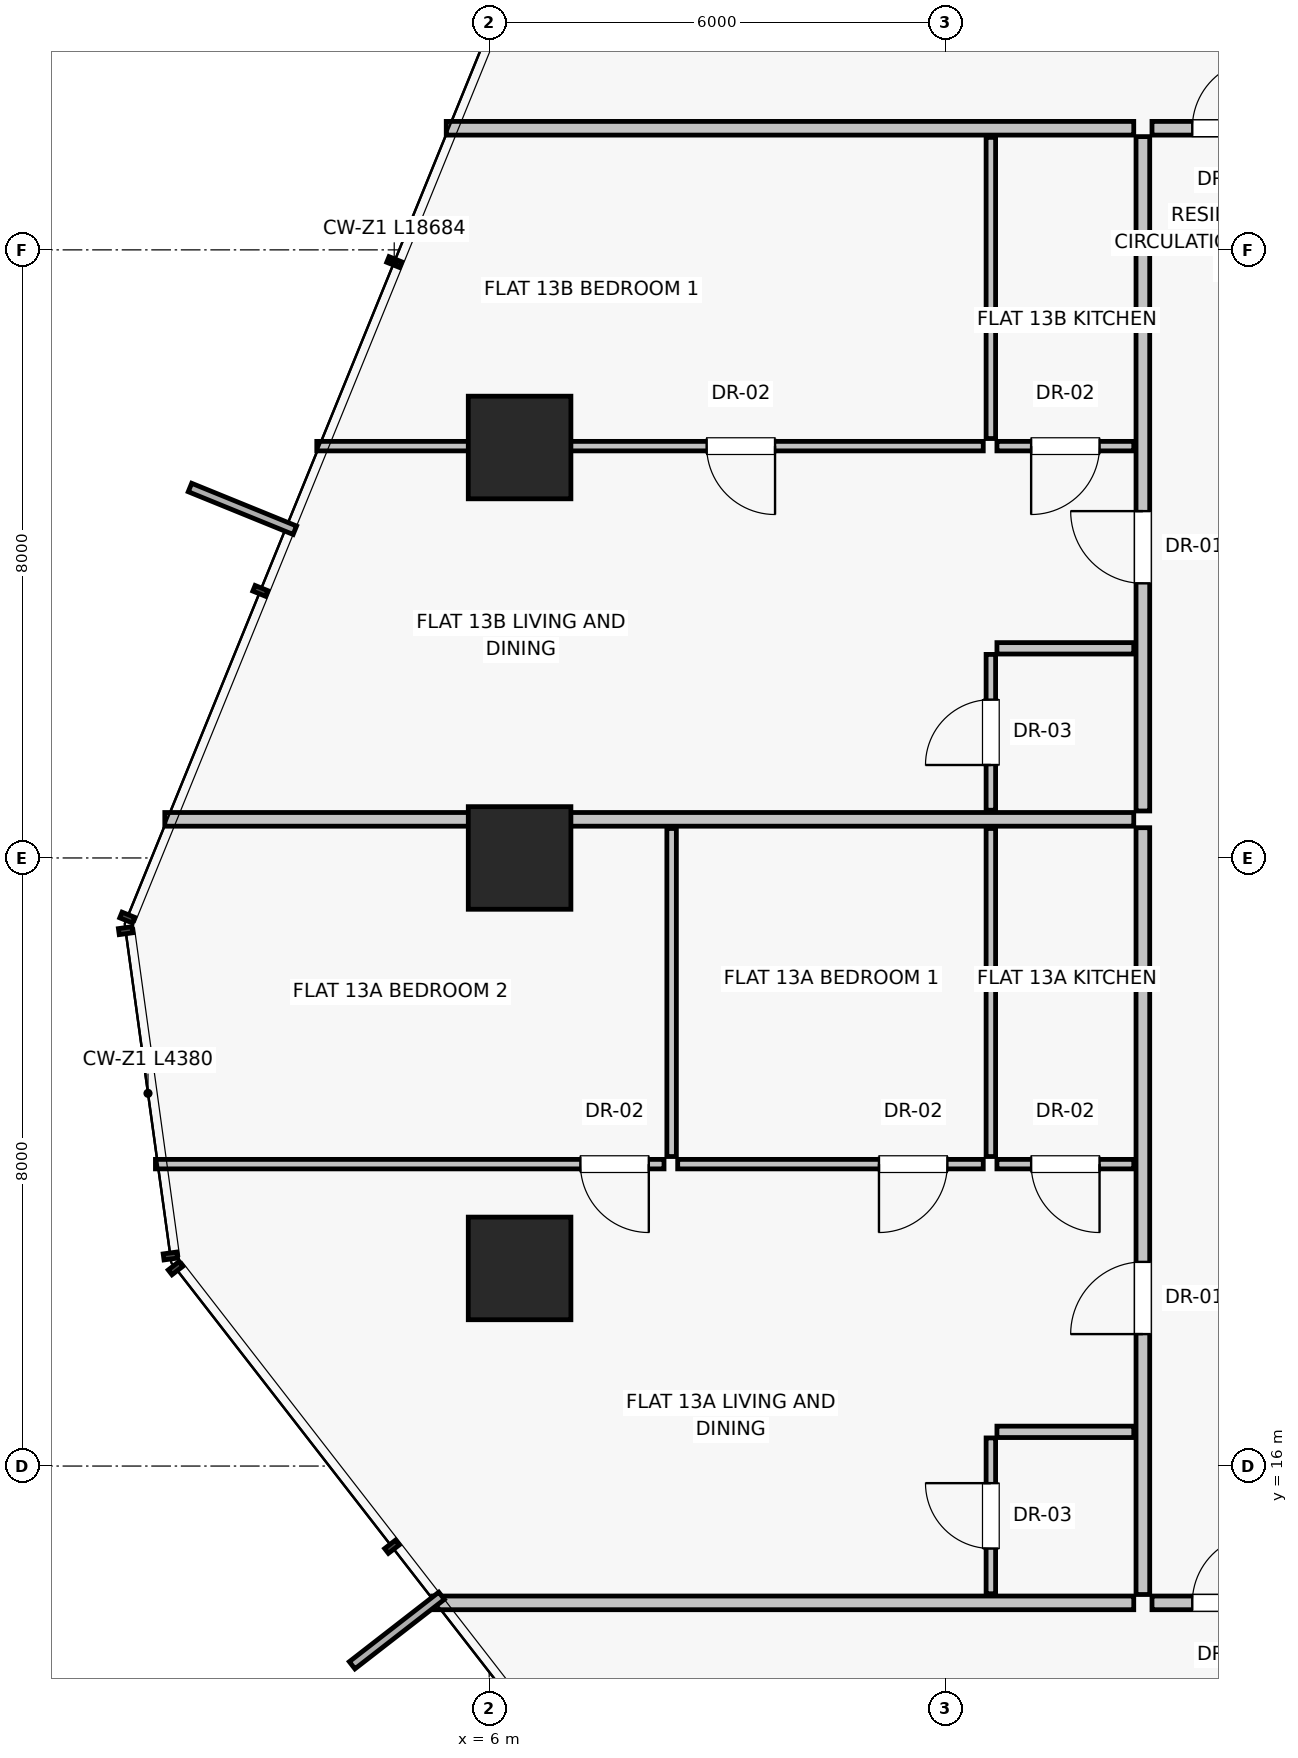
"""IFC4 building model, lengths in metres.
Left out: names, types, materials, properties, quantities, classifications, styles, units other than length and angle.
Written with IfcOpenShell. Run it as: python <this file> out.ifc"""

import sys

from ifc_helpers import new_model, si_unit, direction, frame, frame_2d, origin, origin_2d, place, context, subcontext, project, spatial, rectangle, extrude, source, transform, mapped, element, fill, save


model = new_model("IFC4")
c1 = context("Model", 3, precision=1e-05, world=origin(), true_north=direction((0.0, 1.0)))
c2 = subcontext(c1, "Body", "Model", "MODEL_VIEW")
j1 = project(units=[si_unit("LENGTHUNIT", "METRE"), si_unit("PLANEANGLEUNIT", "RADIAN")], contexts=[c1])
p1 = place(None, origin())
s1 = spatial("IfcSite", under=j1, at=p1, CompositionType="ELEMENT")
p2 = place(p1, origin())
s2 = spatial("IfcBuilding", under=s1, at=p2, CompositionType="ELEMENT")
p3 = place(p2, frame((0.0, 0.0, 50.05)))
s3 = spatial("IfcBuildingStorey", under=s2, at=p3, CompositionType="ELEMENT", Elevation=50.05)
for number, where, z_axis, x_axis in (
    (1, (6.4, 29.4, 0.0), (0.0, 0.0, 1.0), (1.0, 0.0, 0.0)),
    (2, (6.4, 24.0, 0.0), (0.0, 0.0, 1.0), (1.0, 0.0, 0.0)),
    (3, (6.4, 18.6, 0.0), (0.0, 0.0, 1.0), (1.0, 0.0, 0.0)),
):
    element("IfcColumn", number, at=place(p3, frame(where, z_axis=z_axis, x_axis=x_axis)), inside=s3, PredefinedType="COLUMN", context=c2, shape_type="SweptSolid", body=[
        extrude(rectangle(XDim=1.35, YDim=1.35, at=origin_2d()), origin(), (0.0, 0.0, 1.0), 3.25),
    ])
p4 = place(p3, frame((14.48, 14.2, 0.0), z_axis=(0.0, 0.0, 1.0), x_axis=(-1.0, 0.0, 0.0)))
e4 = element("IfcWall", 4, at=p4, inside=s3, PredefinedType="PARTITIONING", context=c2, shape_type="SweptSolid", body=[
    extrude(rectangle(XDim=9.224, YDim=0.18, at=frame_2d((4.612, 0.0))), origin(), (0.0, 0.0, 1.0), 3.0),
])
p5 = place(p3, frame((14.48, 33.6, 0.0), z_axis=(0.0, 0.0, 1.0), x_axis=(-1.0, 0.0, 0.0)))
e5 = element("IfcWall", 5, at=p5, inside=s3, PredefinedType="PARTITIONING", context=c2, shape_type="SweptSolid", body=[
    extrude(rectangle(XDim=9.045, YDim=0.18, at=frame_2d((4.522, 0.0))), origin(), (0.0, 0.0, 1.0), 3.0),
])
p6 = place(p3, frame((14.6, 14.31, 0.0), z_axis=(0.0, 0.0, 1.0), x_axis=(0.0, 1.0, 0.0)))
e6 = element("IfcWall", 6, at=p6, inside=s3, PredefinedType="PARTITIONING", context=c2, shape_type="SweptSolid", body=[
    extrude(rectangle(XDim=10.088, YDim=0.18, at=frame_2d((5.044, 0.0))), origin(), (0.0, 0.0, 1.0), 3.0),
])
p7 = place(p6, frame((3.426, 0.0, 0.0)))
e7 = element("IfcOpeningElement", 7, at=p7, cuts=e6, PredefinedType="OPENING", context=c2, shape_type="SweptSolid", body=[
    extrude(rectangle(XDim=0.95, YDim=2.02, at=frame_2d((0.475, 1.01))), frame((0.0, 0.1, 0.0), z_axis=(0.0, -1.0, 0.0), x_axis=(1.0, 0.0, 0.0)), (0.0, 0.0, 1.0), 0.2),
])
p8 = place(p3, frame((14.48, 16.45, 0.0), z_axis=(0.0, 0.0, 1.0), x_axis=(-1.0, 0.0, 0.0)))
e8 = element("IfcWall", 8, at=p8, inside=s3, PredefinedType="PARTITIONING", context=c2, shape_type="SweptSolid", body=[
    extrude(rectangle(XDim=1.8, YDim=0.15, at=frame_2d((0.9, 0.0))), origin(), (0.0, 0.0, 1.0), 3.0),
])
p9 = place(p3, frame((12.6, 14.32, 0.0), z_axis=(0.0, 0.0, 1.0), x_axis=(0.0, 1.0, 0.0)))
e9 = element("IfcWall", 9, at=p9, inside=s3, PredefinedType="PARTITIONING", context=c2, shape_type="SweptSolid", body=[
    extrude(rectangle(XDim=2.05, YDim=0.125, at=frame_2d((1.025, 0.0))), origin(), (0.0, 0.0, 1.0), 3.0),
])
p10 = place(p9, frame((0.595, 0.0, 0.0)))
e10 = element("IfcOpeningElement", 10, at=p10, cuts=e9, PredefinedType="OPENING", context=c2, shape_type="SweptSolid", body=[
    extrude(rectangle(XDim=0.86, YDim=2.01, at=frame_2d((0.43, 1.005))), frame((0.0, 0.073, 0.0), z_axis=(0.0, -1.0, 0.0), x_axis=(1.0, 0.0, 0.0)), (0.0, 0.0, 1.0), 0.145),
])
p11 = place(p3, frame((14.48, 19.972, 0.0), z_axis=(0.0, 0.0, 1.0), x_axis=(-1.0, 0.0, 0.0)))
e11 = element("IfcWall", 11, at=p11, inside=s3, PredefinedType="PARTITIONING", context=c2, shape_type="SweptSolid", body=[
    extrude(rectangle(XDim=1.8, YDim=0.125, at=frame_2d((0.9, 0.0))), origin(), (0.0, 0.0, 1.0), 3.0),
])
p12 = place(p11, frame((0.45, 0.0, 0.0)))
e12 = element("IfcOpeningElement", 12, at=p12, cuts=e11, PredefinedType="OPENING", context=c2, shape_type="SweptSolid", body=[
    extrude(rectangle(XDim=0.9, YDim=2.01, at=frame_2d((0.45, 1.005))), frame((0.0, 0.073, 0.0), z_axis=(0.0, -1.0, 0.0), x_axis=(1.0, 0.0, 0.0)), (0.0, 0.0, 1.0), 0.145),
])
for number, where, z_axis, x_axis in (
    (13, (12.6, 20.072, 0.0), (0.0, 0.0, 1.0), (0.0, 1.0, 0.0)),
    (14, (8.4, 20.072, 0.0), (0.0, 0.0, 1.0), (0.0, 1.0, 0.0)),
):
    element("IfcWall", number, at=place(p3, frame(where, z_axis=z_axis, x_axis=x_axis)), inside=s3, PredefinedType="PARTITIONING", context=c2, shape_type="SweptSolid", body=[
        extrude(rectangle(XDim=4.316, YDim=0.125, at=frame_2d((2.158, 0.0))), origin(), (0.0, 0.0, 1.0), 3.0),
    ])
p13 = place(p3, frame((12.5, 19.972, 0.0), z_axis=(0.0, 0.0, 1.0), x_axis=(-1.0, 0.0, 0.0)))
e15 = element("IfcWall", 15, at=p13, inside=s3, PredefinedType="PARTITIONING", context=c2, shape_type="SweptSolid", body=[
    extrude(rectangle(XDim=4.02, YDim=0.125, at=frame_2d((2.01, 0.0))), origin(), (0.0, 0.0, 1.0), 3.0),
])
p14 = place(p13, frame((0.472, 0.0, 0.0)))
e16 = element("IfcOpeningElement", 16, at=p14, cuts=e15, PredefinedType="OPENING", context=c2, shape_type="SweptSolid", body=[
    extrude(rectangle(XDim=0.9, YDim=2.01, at=frame_2d((0.45, 1.005))), frame((0.0, 0.073, 0.0), z_axis=(0.0, -1.0, 0.0), x_axis=(1.0, 0.0, 0.0)), (0.0, 0.0, 1.0), 0.145),
])
p15 = place(p3, frame((8.3, 19.972, 0.0), z_axis=(0.0, 0.0, 1.0), x_axis=(-1.0, 0.0, 0.0)))
e17 = element("IfcWall", 17, at=p15, inside=s3, PredefinedType="PARTITIONING", context=c2, shape_type="SweptSolid", body=[
    extrude(rectangle(XDim=6.691, YDim=0.125, at=frame_2d((3.345, 0.0))), origin(), (0.0, 0.0, 1.0), 3.0),
])
p16 = place(p15, frame((0.2, 0.0, 0.0)))
e18 = element("IfcOpeningElement", 18, at=p16, cuts=e17, PredefinedType="OPENING", context=c2, shape_type="SweptSolid", body=[
    extrude(rectangle(XDim=0.9, YDim=2.01, at=frame_2d((0.45, 1.005))), frame((0.0, 0.073, 0.0), z_axis=(0.0, -1.0, 0.0), x_axis=(1.0, 0.0, 0.0)), (0.0, 0.0, 1.0), 0.145),
])
p17 = place(p3, frame((14.48, 24.508, 0.0), z_axis=(0.0, 0.0, 1.0), x_axis=(-1.0, 0.0, 0.0)))
e19 = element("IfcWall", 19, at=p17, inside=s3, PredefinedType="PARTITIONING", context=c2, shape_type="SweptSolid", body=[
    extrude(rectangle(XDim=12.748, YDim=0.18, at=frame_2d((6.374, 0.0))), origin(), (0.0, 0.0, 1.0), 3.0),
])
p18 = place(p3, frame((14.6, 24.618, 0.0), z_axis=(0.0, 0.0, 1.0), x_axis=(0.0, 1.0, 0.0)))
e20 = element("IfcWall", 20, at=p18, inside=s3, PredefinedType="PARTITIONING", context=c2, shape_type="SweptSolid", body=[
    extrude(rectangle(XDim=8.872, YDim=0.18, at=frame_2d((4.436, 0.0))), origin(), (0.0, 0.0, 1.0), 3.0),
])
p19 = place(p18, frame((2.995, 0.0, 0.0)))
e21 = element("IfcOpeningElement", 21, at=p19, cuts=e20, PredefinedType="OPENING", context=c2, shape_type="SweptSolid", body=[
    extrude(rectangle(XDim=0.95, YDim=2.02, at=frame_2d((0.475, 1.01))), frame((0.0, 0.1, 0.0), z_axis=(0.0, -1.0, 0.0), x_axis=(1.0, 0.0, 0.0)), (0.0, 0.0, 1.0), 0.2),
])
p20 = place(p3, frame((14.48, 26.758, 0.0), z_axis=(0.0, 0.0, 1.0), x_axis=(-1.0, 0.0, 0.0)))
e22 = element("IfcWall", 22, at=p20, inside=s3, PredefinedType="PARTITIONING", context=c2, shape_type="SweptSolid", body=[
    extrude(rectangle(XDim=1.8, YDim=0.15, at=frame_2d((0.9, 0.0))), origin(), (0.0, 0.0, 1.0), 3.0),
])
p21 = place(p3, frame((12.6, 24.628, 0.0), z_axis=(0.0, 0.0, 1.0), x_axis=(0.0, 1.0, 0.0)))
e23 = element("IfcWall", 23, at=p21, inside=s3, PredefinedType="PARTITIONING", context=c2, shape_type="SweptSolid", body=[
    extrude(rectangle(XDim=2.05, YDim=0.125, at=frame_2d((1.025, 0.0))), origin(), (0.0, 0.0, 1.0), 3.0),
])
p22 = place(p21, frame((0.595, 0.0, 0.0)))
e24 = element("IfcOpeningElement", 24, at=p22, cuts=e23, PredefinedType="OPENING", context=c2, shape_type="SweptSolid", body=[
    extrude(rectangle(XDim=0.86, YDim=2.01, at=frame_2d((0.43, 1.005))), frame((0.0, 0.073, 0.0), z_axis=(0.0, -1.0, 0.0), x_axis=(1.0, 0.0, 0.0)), (0.0, 0.0, 1.0), 0.145),
])
p23 = place(p3, frame((14.48, 29.418, 0.0), z_axis=(0.0, 0.0, 1.0), x_axis=(-1.0, 0.0, 0.0)))
e25 = element("IfcWall", 25, at=p23, inside=s3, PredefinedType="PARTITIONING", context=c2, shape_type="SweptSolid", body=[
    extrude(rectangle(XDim=1.8, YDim=0.125, at=frame_2d((0.9, 0.0))), origin(), (0.0, 0.0, 1.0), 3.0),
])
p24 = place(p23, frame((0.45, 0.0, 0.0)))
e26 = element("IfcOpeningElement", 26, at=p24, cuts=e25, PredefinedType="OPENING", context=c2, shape_type="SweptSolid", body=[
    extrude(rectangle(XDim=0.9, YDim=2.01, at=frame_2d((0.45, 1.005))), frame((0.0, 0.073, 0.0), z_axis=(0.0, -1.0, 0.0), x_axis=(1.0, 0.0, 0.0)), (0.0, 0.0, 1.0), 0.145),
])
p25 = place(p3, frame((12.6, 29.518, 0.0), z_axis=(0.0, 0.0, 1.0), x_axis=(0.0, 1.0, 0.0)))
e27 = element("IfcWall", 27, at=p25, inside=s3, PredefinedType="PARTITIONING", context=c2, shape_type="SweptSolid", body=[
    extrude(rectangle(XDim=3.962, YDim=0.125, at=frame_2d((1.981, 0.0))), origin(), (0.0, 0.0, 1.0), 3.0),
])
p26 = place(p3, frame((12.5, 29.418, 0.0), z_axis=(0.0, 0.0, 1.0), x_axis=(-1.0, 0.0, 0.0)))
e28 = element("IfcWall", 28, at=p26, inside=s3, PredefinedType="PARTITIONING", context=c2, shape_type="SweptSolid", body=[
    extrude(rectangle(XDim=8.768, YDim=0.125, at=frame_2d((4.384, 0.0))), origin(), (0.0, 0.0, 1.0), 2.299),
])
p27 = place(p26, frame((2.739, 0.0, 0.0)))
e29 = element("IfcOpeningElement", 29, at=p27, cuts=e28, PredefinedType="OPENING", context=c2, shape_type="SweptSolid", body=[
    extrude(rectangle(XDim=0.9, YDim=2.01, at=frame_2d((0.45, 1.005))), frame((0.0, 0.073, 0.0), z_axis=(0.0, -1.0, 0.0), x_axis=(1.0, 0.0, 0.0)), (0.0, 0.0, 1.0), 0.145),
])
p28 = place(p3, frame((14.72, 14.2, 0.0), z_axis=(0.0, 0.0, 1.0), x_axis=(1.0, 0.0, 0.0)))
e30 = element("IfcWall", 30, at=p28, inside=s3, PredefinedType="PARTITIONING", context=c2, shape_type="SweptSolid", body=[
    extrude(rectangle(XDim=1.96, YDim=0.18, at=frame_2d((0.98, 0.0))), origin(), (0.0, 0.0, 1.0), 3.0),
])
p29 = place(p28, frame((0.53, 0.0, 0.0)))
e31 = element("IfcOpeningElement", 31, at=p29, cuts=e30, PredefinedType="OPENING", context=c2, shape_type="SweptSolid", body=[
    extrude(rectangle(XDim=0.9, YDim=2.01, at=frame_2d((0.45, 1.005))), frame((0.0, 0.1, 0.0), z_axis=(0.0, -1.0, 0.0), x_axis=(1.0, 0.0, 0.0)), (0.0, 0.0, 1.0), 0.2),
])
p30 = place(p3, frame((14.72, 33.6, 0.0), z_axis=(0.0, 0.0, 1.0), x_axis=(1.0, 0.0, 0.0)))
e32 = element("IfcWall", 32, at=p30, inside=s3, PredefinedType="PARTITIONING", context=c2, shape_type="SweptSolid", body=[
    extrude(rectangle(XDim=1.96, YDim=0.18, at=frame_2d((0.98, 0.0))), origin(), (0.0, 0.0, 1.0), 3.0),
])
p31 = place(p30, frame((0.53, 0.0, 0.0)))
e33 = element("IfcOpeningElement", 33, at=p31, cuts=e32, PredefinedType="OPENING", context=c2, shape_type="SweptSolid", body=[
    extrude(rectangle(XDim=0.9, YDim=2.01, at=frame_2d((0.45, 1.005))), frame((0.0, 0.1, 0.0), z_axis=(0.0, -1.0, 0.0), x_axis=(1.0, 0.0, 0.0)), (0.0, 0.0, 1.0), 0.2),
])
m1 = source(origin(), c2, "Body", "SweptSolid", [
    extrude(rectangle(XDim=0.95, YDim=2.02, at=frame_2d((0.475, 1.01))), frame((0.0, 0.025, 0.0), z_axis=(0.0, -1.0, 0.0), x_axis=(1.0, 0.0, 0.0)), (0.0, 0.0, 1.0), 0.05),
])
p32 = place(p7, origin())
e34 = element("IfcDoor", 34, at=p32, inside=s3, OperationType="SINGLE_SWING_LEFT", PredefinedType="DOOR", context=c2, shape_type="MappedRepresentation", body=[
    mapped(m1, transform((0.0, 0.0, 0.0), scale=1.0)),
])
fill(e7, e34)
m2 = source(origin(), c2, "Body", "SweptSolid", [
    extrude(rectangle(XDim=0.86, YDim=2.01, at=frame_2d((0.43, 1.005))), frame((0.0, 0.025, 0.0), z_axis=(0.0, -1.0, 0.0), x_axis=(1.0, 0.0, 0.0)), (0.0, 0.0, 1.0), 0.05),
])
p33 = place(p10, origin())
e35 = element("IfcDoor", 35, at=p33, inside=s3, OperationType="SINGLE_SWING_RIGHT", PredefinedType="DOOR", context=c2, shape_type="MappedRepresentation", body=[
    mapped(m2, transform((0.0, 0.0, 0.0), scale=1.0)),
])
fill(e10, e35)
m3 = source(origin(), c2, "Body", "SweptSolid", [
    extrude(rectangle(XDim=0.9, YDim=2.01, at=frame_2d((0.45, 1.005))), frame((0.0, 0.025, 0.0), z_axis=(0.0, -1.0, 0.0), x_axis=(1.0, 0.0, 0.0)), (0.0, 0.0, 1.0), 0.05),
])
p34 = place(p12, origin())
e36 = element("IfcDoor", 36, at=p34, inside=s3, OperationType="SINGLE_SWING_LEFT", PredefinedType="DOOR", context=c2, shape_type="MappedRepresentation", body=[
    mapped(m3, transform((0.0, 0.0, 0.0), scale=1.0)),
])
fill(e12, e36)
p35 = place(p14, origin())
e37 = element("IfcDoor", 37, at=p35, inside=s3, OperationType="SINGLE_SWING_RIGHT", PredefinedType="DOOR", context=c2, shape_type="MappedRepresentation", body=[
    mapped(m3, transform((0.0, 0.0, 0.0), scale=1.0)),
])
fill(e16, e37)
p36 = place(p16, origin())
e38 = element("IfcDoor", 38, at=p36, inside=s3, OperationType="SINGLE_SWING_LEFT", PredefinedType="DOOR", context=c2, shape_type="MappedRepresentation", body=[
    mapped(m3, transform((0.0, 0.0, 0.0), scale=1.0)),
])
fill(e18, e38)
p37 = place(p19, origin())
e39 = element("IfcDoor", 39, at=p37, inside=s3, OperationType="SINGLE_SWING_RIGHT", PredefinedType="DOOR", context=c2, shape_type="MappedRepresentation", body=[
    mapped(m1, transform((0.0, 0.0, 0.0), scale=1.0)),
])
fill(e21, e39)
p38 = place(p22, origin())
e40 = element("IfcDoor", 40, at=p38, inside=s3, OperationType="SINGLE_SWING_LEFT", PredefinedType="DOOR", context=c2, shape_type="MappedRepresentation", body=[
    mapped(m2, transform((0.0, 0.0, 0.0), scale=1.0)),
])
fill(e24, e40)
p39 = place(p24, origin())
e41 = element("IfcDoor", 41, at=p39, inside=s3, OperationType="SINGLE_SWING_RIGHT", PredefinedType="DOOR", context=c2, shape_type="MappedRepresentation", body=[
    mapped(m3, transform((0.0, 0.0, 0.0), scale=1.0)),
])
fill(e26, e41)
p40 = place(p27, origin())
e42 = element("IfcDoor", 42, at=p40, inside=s3, OperationType="SINGLE_SWING_LEFT", PredefinedType="DOOR", context=c2, shape_type="MappedRepresentation", body=[
    mapped(m3, transform((0.0, 0.0, 0.0), scale=1.0)),
])
fill(e29, e42)
p41 = place(p29, origin())
e43 = element("IfcDoor", 43, at=p41, inside=s3, OperationType="SINGLE_SWING_RIGHT", PredefinedType="DOOR", context=c2, shape_type="MappedRepresentation", body=[
    mapped(m3, transform((0.0, 0.0, 0.0), scale=1.0)),
])
fill(e31, e43)
p42 = place(p31, origin())
e44 = element("IfcDoor", 44, at=p42, inside=s3, OperationType="SINGLE_SWING_RIGHT", PredefinedType="DOOR", context=c2, shape_type="MappedRepresentation", body=[
    mapped(m3, transform((0.0, 0.0, 0.0), scale=1.0)),
])
fill(e33, e44)
save(model, sys.argv[1])
